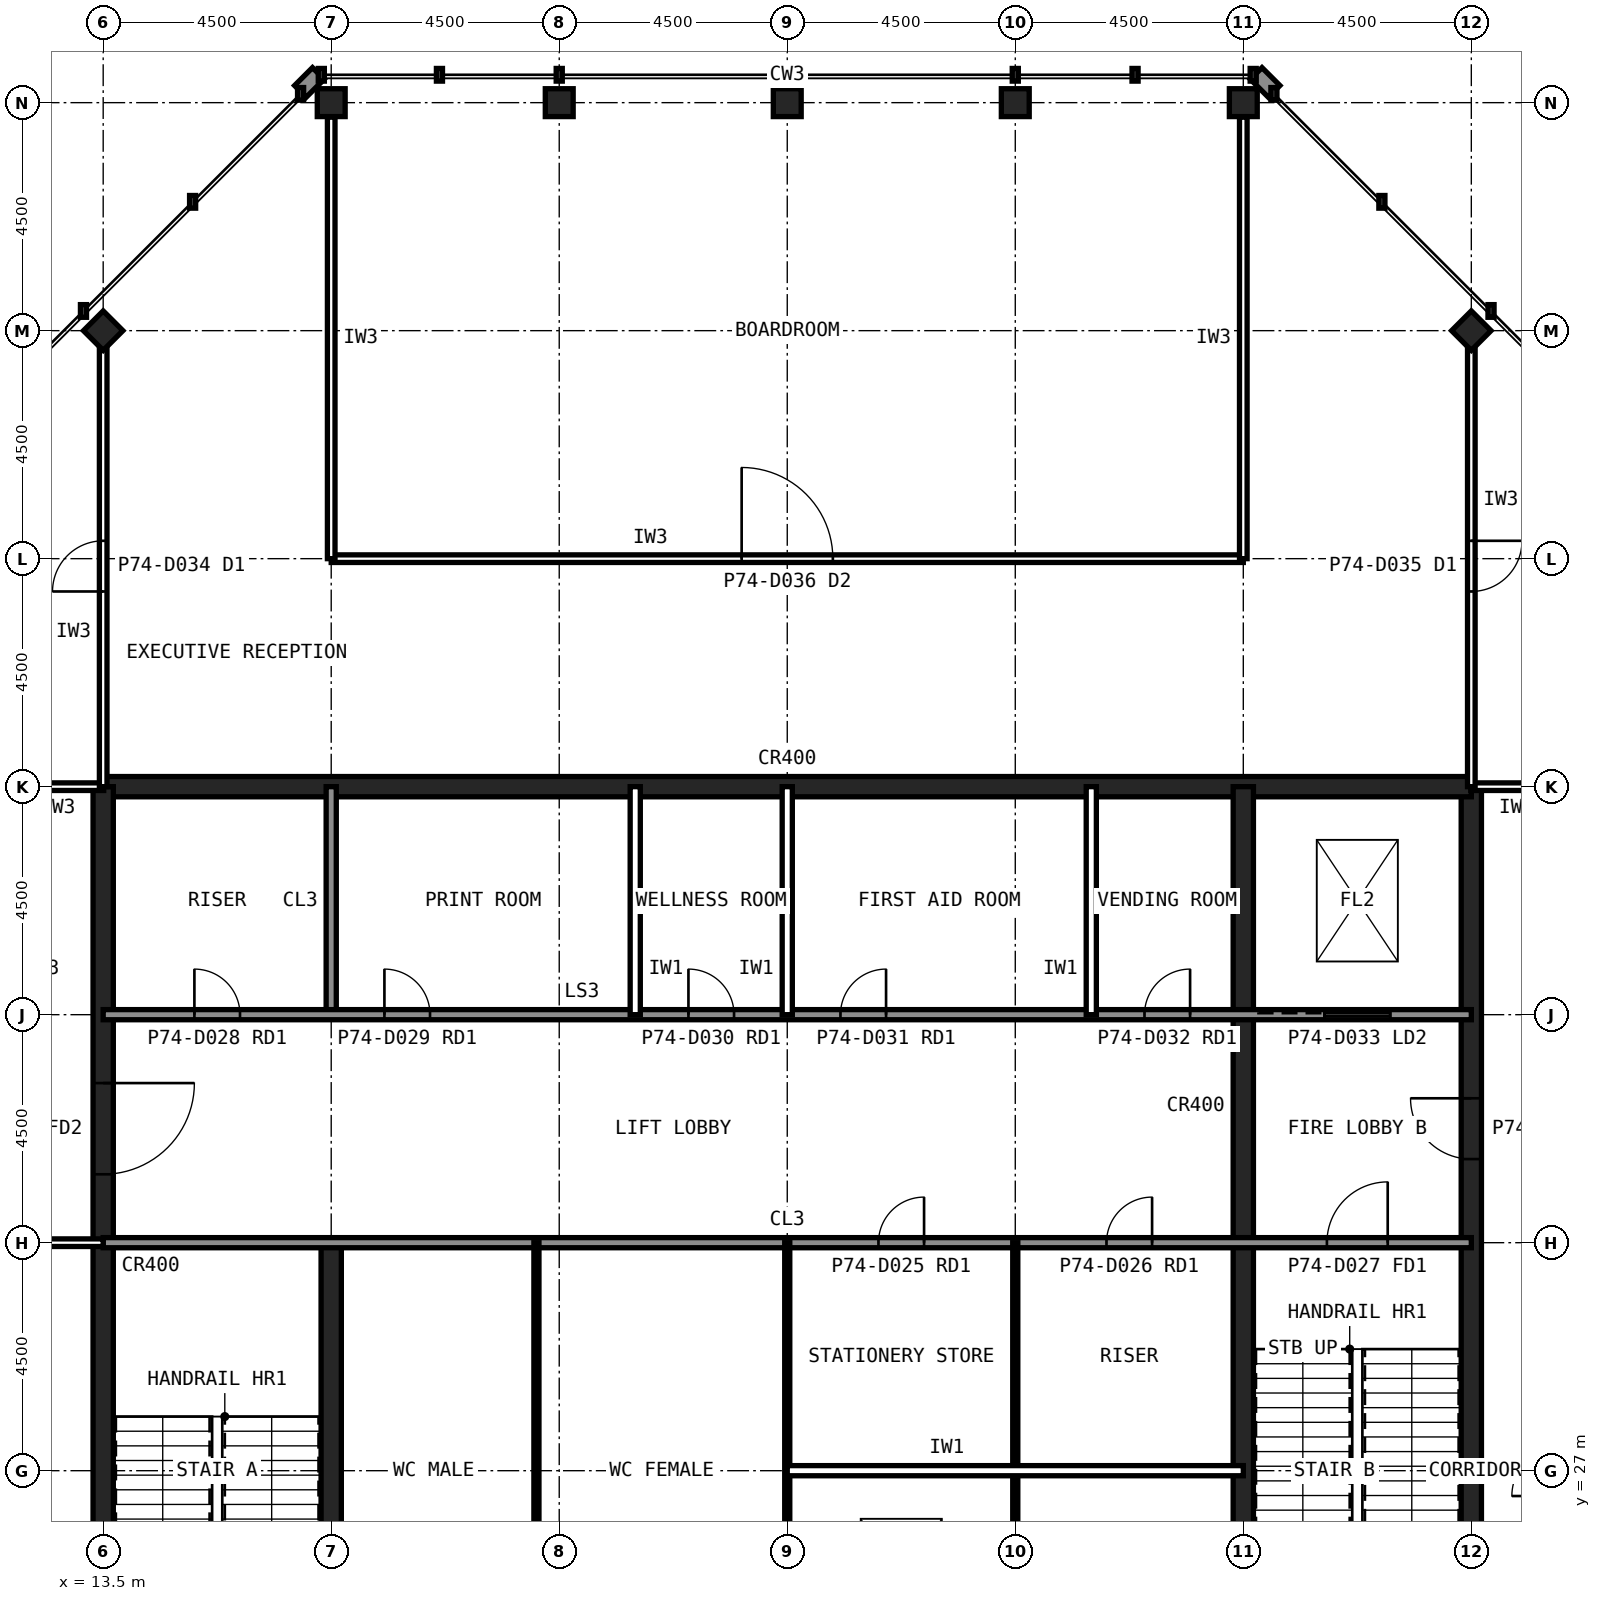
"""IFC4 building model, lengths in metres.
Left out: names, types, materials, properties, quantities, classifications, styles, units other than length and angle.
Written with IfcOpenShell. Run it as: python <this file> out.ifc"""

import sys

from ifc_helpers import new_model, si_unit, direction, frame, frame_2d, origin, origin_2d, place, context, subcontext, project, spatial, rectangle, hollow_rectangle, extrude, element, fill, save


model = new_model("IFC4")
c1 = context("Model", 3, precision=1e-05, world=origin(), true_north=direction((0.0, 1.0)))
c2 = subcontext(c1, "Body", "Model", "MODEL_VIEW")
j1 = project(units=[si_unit("LENGTHUNIT", "METRE"), si_unit("PLANEANGLEUNIT", "RADIAN")], contexts=[c1])
p1 = place(None, origin())
s1 = spatial("IfcSite", under=j1, at=p1, CompositionType="ELEMENT")
p2 = place(p1, origin())
s2 = spatial("IfcBuilding", under=s1, at=p2, CompositionType="ELEMENT")
p3 = place(p2, frame((0.0, 0.0, 310.6)))
s3 = spatial("IfcBuildingStorey", under=s2, at=p3, CompositionType="ELEMENT", Elevation=310.6)
for number, where, z_axis, x_axis in (
    (1, (36.0, 54.0, 0.0), (0.0, 0.0, 1.0), (1.0, 0.0, 0.0)),
    (2, (31.5, 54.0, 0.0), (0.0, 0.0, 1.0), (1.0, 0.0, 0.0)),
    (3, (27.0, 54.0, 0.0), (0.0, 0.0, 1.0), (1.0, 0.0, 0.0)),
    (4, (22.5, 54.0, 0.0), (0.0, 0.0, 1.0), (1.0, 0.0, 0.0)),
    (5, (18.0, 54.0, 0.0), (0.0, 0.0, 1.0), (1.0, 0.0, 0.0)),
    (6, (40.5, 49.5, 0.0), (0.0, 0.0, 1.0), (0.707, 0.707, 0.0)),
    (7, (13.5, 49.5, 0.0), (0.0, 0.0, 1.0), (0.707, 0.707, 0.0)),
):
    element("IfcColumn", number, at=place(p3, frame(where, z_axis=z_axis, x_axis=x_axis)), inside=s3, PredefinedType="COLUMN", context=c2, shape_type="SweptSolid", body=[
        extrude(hollow_rectangle(XDim=0.55, YDim=0.55, WallThickness=0.025, at=origin_2d()), origin(), (0.0, 0.0, 1.0), 4.5),
    ])
p4 = place(p3, frame((40.5, 13.5, 0.0), z_axis=(0.0, 0.0, 1.0), x_axis=(0.0, 1.0, 0.0)))
e8 = element("IfcWall", 8, at=p4, inside=s3, PredefinedType="SHEAR", context=c2, shape_type="SweptSolid", body=[
    extrude(rectangle(XDim=27.0, YDim=0.4, at=frame_2d((13.5, 0.0))), origin(), (0.0, 0.0, 1.0), 4.5),
])
p5 = place(p4, frame((5.85, 0.0, 0.0)))
e9 = element("IfcOpeningElement", 9, at=p5, cuts=e8, PredefinedType="OPENING", context=c2, shape_type="SweptSolid", body=[
    extrude(rectangle(XDim=1.8, YDim=2.1, at=frame_2d((0.9, 1.05))), frame((0.0, 0.21, 0.0), z_axis=(0.0, -1.0, 0.0), x_axis=(1.0, 0.0, 0.0)), (0.0, 0.0, 1.0), 0.42),
])
p6 = place(p4, frame((19.65, 0.0, 0.0)))
e10 = element("IfcOpeningElement", 10, at=p6, cuts=e8, PredefinedType="OPENING", context=c2, shape_type="SweptSolid", body=[
    extrude(rectangle(XDim=1.2, YDim=2.1, at=frame_2d((0.6, 1.05))), frame((0.0, 0.21, 0.0), z_axis=(0.0, -1.0, 0.0), x_axis=(1.0, 0.0, 0.0)), (0.0, 0.0, 1.0), 0.42),
])
p7 = place(p3, frame((40.5, 40.5, 0.0), z_axis=(0.0, 0.0, 1.0), x_axis=(-1.0, 0.0, 0.0)))
e11 = element("IfcWall", 11, at=p7, inside=s3, PredefinedType="SHEAR", context=c2, shape_type="SweptSolid", body=[
    extrude(rectangle(XDim=27.0, YDim=0.4, at=frame_2d((13.5, 0.0))), origin(), (0.0, 0.0, 1.0), 4.5),
])
p8 = place(p3, frame((13.5, 40.5, 0.0), z_axis=(0.0, 0.0, 1.0), x_axis=(0.0, -1.0, 0.0)))
e12 = element("IfcWall", 12, at=p8, inside=s3, PredefinedType="SHEAR", context=c2, shape_type="SweptSolid", body=[
    extrude(rectangle(XDim=27.0, YDim=0.4, at=frame_2d((13.5, 0.0))), origin(), (0.0, 0.0, 1.0), 4.5),
])
p9 = place(p8, frame((19.65, 0.0, 0.0)))
e13 = element("IfcOpeningElement", 13, at=p9, cuts=e12, PredefinedType="OPENING", context=c2, shape_type="SweptSolid", body=[
    extrude(rectangle(XDim=1.2, YDim=2.1, at=frame_2d((0.6, 1.05))), frame((0.0, 0.21, 0.0), z_axis=(0.0, -1.0, 0.0), x_axis=(1.0, 0.0, 0.0)), (0.0, 0.0, 1.0), 0.42),
])
p10 = place(p8, frame((5.85, 0.0, 0.0)))
e14 = element("IfcOpeningElement", 14, at=p10, cuts=e12, PredefinedType="OPENING", context=c2, shape_type="SweptSolid", body=[
    extrude(rectangle(XDim=1.8, YDim=2.1, at=frame_2d((0.9, 1.05))), frame((0.0, 0.21, 0.0), z_axis=(0.0, -1.0, 0.0), x_axis=(1.0, 0.0, 0.0)), (0.0, 0.0, 1.0), 0.42),
])
p11 = place(p3, frame((18.0, 13.5, 0.0), z_axis=(0.0, 0.0, 1.0), x_axis=(0.0, 1.0, 0.0)))
e15 = element("IfcWall", 15, at=p11, inside=s3, PredefinedType="SHEAR", context=c2, shape_type="SweptSolid", body=[
    extrude(rectangle(XDim=18.0, YDim=0.4, at=frame_2d((9.0, 0.0))), origin(), (0.0, 0.0, 1.0), 4.5),
])
p12 = place(p3, frame((18.0, 36.0, 0.0), z_axis=(0.0, 0.0, 1.0), x_axis=(0.0, 1.0, 0.0)))
e16 = element("IfcWall", 16, at=p12, inside=s3, PredefinedType="SOLIDWALL", context=c2, shape_type="SweptSolid", body=[
    extrude(rectangle(XDim=4.5, YDim=0.2, at=frame_2d((2.25, 0.0))), origin(), (0.0, 0.0, 1.0), 4.32),
])
p13 = place(p3, frame((36.0, 22.5, 0.0), z_axis=(0.0, 0.0, 1.0), x_axis=(0.0, 1.0, 0.0)))
e17 = element("IfcWall", 17, at=p13, inside=s3, PredefinedType="SHEAR", context=c2, shape_type="SweptSolid", body=[
    extrude(rectangle(XDim=18.0, YDim=0.4, at=frame_2d((9.0, 0.0))), origin(), (0.0, 0.0, 1.0), 4.5),
])
p14 = place(p3, frame((13.5, 36.0, 0.0), z_axis=(0.0, 0.0, 1.0), x_axis=(1.0, 0.0, 0.0)))
e18 = element("IfcWall", 18, at=p14, inside=s3, PredefinedType="SOLIDWALL", context=c2, shape_type="SweptSolid", body=[
    extrude(rectangle(XDim=27.0, YDim=0.2, at=frame_2d((13.5, 0.0))), origin(), (0.0, 0.0, 1.0), 4.32),
])
p15 = place(p14, frame((1.8, 0.0, 0.0)))
e19 = element("IfcOpeningElement", 19, at=p15, cuts=e18, PredefinedType="OPENING", context=c2, shape_type="SweptSolid", body=[
    extrude(rectangle(XDim=0.9, YDim=2.1, at=frame_2d((0.45, 1.05))), frame((0.0, 0.11, 0.0), z_axis=(0.0, -1.0, 0.0), x_axis=(1.0, 0.0, 0.0)), (0.0, 0.0, 1.0), 0.22),
])
p16 = place(p14, frame((5.55, 0.0, 0.0)))
e20 = element("IfcOpeningElement", 20, at=p16, cuts=e18, PredefinedType="OPENING", context=c2, shape_type="SweptSolid", body=[
    extrude(rectangle(XDim=0.9, YDim=2.1, at=frame_2d((0.45, 1.05))), frame((0.0, 0.11, 0.0), z_axis=(0.0, -1.0, 0.0), x_axis=(1.0, 0.0, 0.0)), (0.0, 0.0, 1.0), 0.22),
])
p17 = place(p14, frame((11.55, 0.0, 0.0)))
e21 = element("IfcOpeningElement", 21, at=p17, cuts=e18, PredefinedType="OPENING", context=c2, shape_type="SweptSolid", body=[
    extrude(rectangle(XDim=0.9, YDim=2.1, at=frame_2d((0.45, 1.05))), frame((0.0, 0.11, 0.0), z_axis=(0.0, -1.0, 0.0), x_axis=(1.0, 0.0, 0.0)), (0.0, 0.0, 1.0), 0.22),
])
p18 = place(p14, frame((14.55, 0.0, 0.0)))
e22 = element("IfcOpeningElement", 22, at=p18, cuts=e18, PredefinedType="OPENING", context=c2, shape_type="SweptSolid", body=[
    extrude(rectangle(XDim=0.9, YDim=2.1, at=frame_2d((0.45, 1.05))), frame((0.0, 0.11, 0.0), z_axis=(0.0, -1.0, 0.0), x_axis=(1.0, 0.0, 0.0)), (0.0, 0.0, 1.0), 0.22),
])
p19 = place(p14, frame((20.55, 0.0, 0.0)))
e23 = element("IfcOpeningElement", 23, at=p19, cuts=e18, PredefinedType="OPENING", context=c2, shape_type="SweptSolid", body=[
    extrude(rectangle(XDim=0.9, YDim=2.1, at=frame_2d((0.45, 1.05))), frame((0.0, 0.11, 0.0), z_axis=(0.0, -1.0, 0.0), x_axis=(1.0, 0.0, 0.0)), (0.0, 0.0, 1.0), 0.22),
])
p20 = place(p14, frame((24.1, 0.0, 0.0)))
e24 = element("IfcOpeningElement", 24, at=p20, cuts=e18, PredefinedType="OPENING", context=c2, shape_type="SweptSolid", body=[
    extrude(rectangle(XDim=1.3, YDim=2.2, at=frame_2d((0.65, 1.1))), frame((0.0, 0.11, 0.0), z_axis=(0.0, -1.0, 0.0), x_axis=(1.0, 0.0, 0.0)), (0.0, 0.0, 1.0), 0.22),
])
p21 = place(p3, frame((13.5, 31.5, 0.0), z_axis=(0.0, 0.0, 1.0), x_axis=(1.0, 0.0, 0.0)))
e25 = element("IfcWall", 25, at=p21, inside=s3, PredefinedType="SOLIDWALL", context=c2, shape_type="SweptSolid", body=[
    extrude(rectangle(XDim=27.0, YDim=0.2, at=frame_2d((13.5, 0.0))), origin(), (0.0, 0.0, 1.0), 4.32),
])
p22 = place(p21, frame((24.15, 0.0, 0.0)))
e26 = element("IfcOpeningElement", 26, at=p22, cuts=e25, PredefinedType="OPENING", context=c2, shape_type="SweptSolid", body=[
    extrude(rectangle(XDim=1.2, YDim=2.1, at=frame_2d((0.6, 1.05))), frame((0.0, 0.11, 0.0), z_axis=(0.0, -1.0, 0.0), x_axis=(1.0, 0.0, 0.0)), (0.0, 0.0, 1.0), 0.22),
])
p23 = place(p21, frame((15.3, 0.0, 0.0)))
e27 = element("IfcOpeningElement", 27, at=p23, cuts=e25, PredefinedType="OPENING", context=c2, shape_type="SweptSolid", body=[
    extrude(rectangle(XDim=0.9, YDim=2.1, at=frame_2d((0.45, 1.05))), frame((0.0, 0.11, 0.0), z_axis=(0.0, -1.0, 0.0), x_axis=(1.0, 0.0, 0.0)), (0.0, 0.0, 1.0), 0.22),
])
p24 = place(p21, frame((19.8, 0.0, 0.0)))
e28 = element("IfcOpeningElement", 28, at=p24, cuts=e25, PredefinedType="OPENING", context=c2, shape_type="SweptSolid", body=[
    extrude(rectangle(XDim=0.9, YDim=2.1, at=frame_2d((0.45, 1.05))), frame((0.0, 0.11, 0.0), z_axis=(0.0, -1.0, 0.0), x_axis=(1.0, 0.0, 0.0)), (0.0, 0.0, 1.0), 0.22),
])
for number, where, z_axis, x_axis in (
    (29, (24.0, 36.0, 0.0), (0.0, 0.0, 1.0), (0.0, 1.0, 0.0)),
    (30, (27.0, 36.0, 0.0), (0.0, 0.0, 1.0), (0.0, 1.0, 0.0)),
    (31, (33.0, 36.0, 0.0), (0.0, 0.0, 1.0), (0.0, 1.0, 0.0)),
):
    element("IfcWall", number, at=place(p3, frame(where, z_axis=z_axis, x_axis=x_axis)), inside=s3, PredefinedType="PARTITIONING", context=c2, shape_type="SweptSolid", body=[
        extrude(rectangle(XDim=4.5, YDim=0.2, at=frame_2d((2.25, 0.0))), origin(), (0.0, 0.0, 1.0), 4.32),
    ])
for number, where, z_axis, x_axis in (
    (32, (22.05, 22.5, 0.0), (0.0, 0.0, 1.0), (0.0, 1.0, 0.0)),
    (33, (27.0, 22.5, 0.0), (0.0, 0.0, 1.0), (0.0, 1.0, 0.0)),
    (34, (31.5, 22.5, 0.0), (0.0, 0.0, 1.0), (0.0, 1.0, 0.0)),
):
    element("IfcWall", number, at=place(p3, frame(where, z_axis=z_axis, x_axis=x_axis)), inside=s3, PredefinedType="PLUMBINGWALL", context=c2, shape_type="SweptSolid", body=[
        extrude(rectangle(XDim=9.0, YDim=0.1, at=frame_2d((4.5, 0.0))), origin(), (0.0, 0.0, 1.0), 4.32),
    ])
p25 = place(p3, frame((27.0, 27.0, 0.0), z_axis=(0.0, 0.0, 1.0), x_axis=(1.0, 0.0, 0.0)))
e35 = element("IfcWall", 35, at=p25, inside=s3, PredefinedType="PARTITIONING", context=c2, shape_type="SweptSolid", body=[
    extrude(rectangle(XDim=9.0, YDim=0.2, at=frame_2d((4.5, 0.0))), origin(), (0.0, 0.0, 1.0), 4.32),
])
for number, where, z_axis, x_axis in (
    (36, (13.51, 40.5, 0.0), (0.0, 0.0, 1.0), (-1.0, 0.0, 0.0)),
    (37, (42.3, 40.5, 0.0), (0.0, 0.0, 1.0), (-1.0, 0.0, 0.0)),
):
    element("IfcWall", number, at=place(p3, frame(where, z_axis=z_axis, x_axis=x_axis)), inside=s3, PredefinedType="PARTITIONING", context=c2, shape_type="SweptSolid", body=[
        extrude(rectangle(XDim=1.81, YDim=0.15, at=frame_2d((0.905, 0.0))), origin(), (0.0, 0.0, 1.0), 3.393),
    ])
p26 = place(p3, frame((18.0, 45.0, 0.0), z_axis=(0.0, 0.0, 1.0), x_axis=(1.0, 0.0, 0.0)))
e38 = element("IfcWall", 38, at=p26, inside=s3, PredefinedType="PARTITIONING", context=c2, shape_type="SweptSolid", body=[
    extrude(rectangle(XDim=18.0, YDim=0.15, at=frame_2d((9.0, 0.0))), origin(), (0.0, 0.0, 1.0), 4.32),
])
p27 = place(p26, frame((8.1, 0.0, 0.0)))
e39 = element("IfcOpeningElement", 39, at=p27, cuts=e38, PredefinedType="OPENING", context=c2, shape_type="SweptSolid", body=[
    extrude(rectangle(XDim=1.8, YDim=2.4, at=frame_2d((0.9, 1.2))), frame((0.0, 0.085, 0.0), z_axis=(0.0, -1.0, 0.0), x_axis=(1.0, 0.0, 0.0)), (0.0, 0.0, 1.0), 0.17),
])
for number, where, z_axis, x_axis in (
    (40, (36.0, 45.0, 0.0), (0.0, 0.0, 1.0), (0.0, 1.0, 0.0)),
    (41, (18.0, 53.715, 0.0), (0.0, 0.0, 1.0), (0.0, -1.0, 0.0)),
):
    element("IfcWall", number, at=place(p3, frame(where, z_axis=z_axis, x_axis=x_axis)), inside=s3, PredefinedType="PARTITIONING", context=c2, shape_type="SweptSolid", body=[
        extrude(rectangle(XDim=8.715, YDim=0.15, at=frame_2d((4.357, 0.0))), origin(), (0.0, 0.0, 1.0), 3.393),
    ])
p28 = place(p3, frame((13.5, 31.5, 0.0), z_axis=(0.0, 0.0, 1.0), x_axis=(-1.0, 0.0, 0.0)))
e42 = element("IfcWall", 42, at=p28, inside=s3, PredefinedType="PARTITIONING", context=c2, shape_type="SweptSolid", body=[
    extrude(rectangle(XDim=4.5, YDim=0.15, at=frame_2d((2.25, 0.0))), origin(), (0.0, 0.0, 1.0), 3.393),
])
p29 = place(p3, frame((40.5, 49.205, 0.0), z_axis=(0.0, 0.0, 1.0), x_axis=(0.0, -1.0, 0.0)))
e43 = element("IfcWall", 43, at=p29, inside=s3, PredefinedType="PARTITIONING", context=c2, shape_type="SweptSolid", body=[
    extrude(rectangle(XDim=8.705, YDim=0.15, at=frame_2d((4.353, 0.0))), origin(), (0.0, 0.0, 1.0), 3.393),
])
p30 = place(p29, frame((3.853, 0.0, 0.0)))
e44 = element("IfcOpeningElement", 44, at=p30, cuts=e43, PredefinedType="OPENING", context=c2, shape_type="SweptSolid", body=[
    extrude(rectangle(XDim=1.0, YDim=2.1, at=frame_2d((0.5, 1.05))), frame((0.0, 0.085, 0.0), z_axis=(0.0, -1.0, 0.0), x_axis=(1.0, 0.0, 0.0)), (0.0, 0.0, 1.0), 0.17),
])
p31 = place(p3, frame((13.5, 40.5, 0.0), z_axis=(0.0, 0.0, 1.0), x_axis=(0.0, 1.0, 0.0)))
e45 = element("IfcWall", 45, at=p31, inside=s3, PredefinedType="PARTITIONING", context=c2, shape_type="SweptSolid", body=[
    extrude(rectangle(XDim=8.705, YDim=0.15, at=frame_2d((4.353, 0.0))), origin(), (0.0, 0.0, 1.0), 3.393),
])
p32 = place(p31, frame((3.853, 0.0, 0.0)))
e46 = element("IfcOpeningElement", 46, at=p32, cuts=e45, PredefinedType="OPENING", context=c2, shape_type="SweptSolid", body=[
    extrude(rectangle(XDim=1.0, YDim=2.1, at=frame_2d((0.5, 1.05))), frame((0.0, 0.085, 0.0), z_axis=(0.0, -1.0, 0.0), x_axis=(1.0, 0.0, 0.0)), (0.0, 0.0, 1.0), 0.17),
])
p33 = place(p10, origin())
e47 = element("IfcDoor", 47, at=p33, inside=s3, OperationType="SINGLE_SWING_LEFT", PredefinedType="DOOR", context=c2, shape_type="SweptSolid", body=[
    extrude(rectangle(XDim=1.8, YDim=2.1, at=frame_2d((0.9, 1.05))), frame((0.0, 0.025, 0.0), z_axis=(0.0, -1.0, 0.0), x_axis=(1.0, 0.0, 0.0)), (0.0, 0.0, 1.0), 0.05),
])
fill(e14, e47)
p34 = place(p6, origin())
e48 = element("IfcDoor", 48, at=p34, inside=s3, OperationType="SINGLE_SWING_RIGHT", PredefinedType="DOOR", context=c2, shape_type="SweptSolid", body=[
    extrude(rectangle(XDim=1.2, YDim=2.1, at=frame_2d((0.6, 1.05))), frame((0.0, 0.025, 0.0), z_axis=(0.0, -1.0, 0.0), x_axis=(1.0, 0.0, 0.0)), (0.0, 0.0, 1.0), 0.05),
])
fill(e10, e48)
p35 = place(p22, origin())
e49 = element("IfcDoor", 49, at=p35, inside=s3, OperationType="SINGLE_SWING_RIGHT", PredefinedType="DOOR", context=c2, shape_type="SweptSolid", body=[
    extrude(rectangle(XDim=1.2, YDim=2.1, at=frame_2d((0.6, 1.05))), frame((0.0, 0.025, 0.0), z_axis=(0.0, -1.0, 0.0), x_axis=(1.0, 0.0, 0.0)), (0.0, 0.0, 1.0), 0.05),
])
fill(e26, e49)
p36 = place(p23, origin())
e50 = element("IfcDoor", 50, at=p36, inside=s3, OperationType="SINGLE_SWING_RIGHT", PredefinedType="DOOR", context=c2, shape_type="SweptSolid", body=[
    extrude(rectangle(XDim=0.9, YDim=2.1, at=frame_2d((0.45, 1.05))), frame((0.0, 0.025, 0.0), z_axis=(0.0, -1.0, 0.0), x_axis=(1.0, 0.0, 0.0)), (0.0, 0.0, 1.0), 0.05),
])
fill(e27, e50)
p37 = place(p24, origin())
e51 = element("IfcDoor", 51, at=p37, inside=s3, OperationType="SINGLE_SWING_RIGHT", PredefinedType="DOOR", context=c2, shape_type="SweptSolid", body=[
    extrude(rectangle(XDim=0.9, YDim=2.1, at=frame_2d((0.45, 1.05))), frame((0.0, 0.025, 0.0), z_axis=(0.0, -1.0, 0.0), x_axis=(1.0, 0.0, 0.0)), (0.0, 0.0, 1.0), 0.05),
])
fill(e28, e51)
p38 = place(p15, origin())
e52 = element("IfcDoor", 52, at=p38, inside=s3, OperationType="SINGLE_SWING_LEFT", PredefinedType="DOOR", context=c2, shape_type="SweptSolid", body=[
    extrude(rectangle(XDim=0.9, YDim=2.1, at=frame_2d((0.45, 1.05))), frame((0.0, 0.025, 0.0), z_axis=(0.0, -1.0, 0.0), x_axis=(1.0, 0.0, 0.0)), (0.0, 0.0, 1.0), 0.05),
])
fill(e19, e52)
p39 = place(p16, origin())
e53 = element("IfcDoor", 53, at=p39, inside=s3, OperationType="SINGLE_SWING_LEFT", PredefinedType="DOOR", context=c2, shape_type="SweptSolid", body=[
    extrude(rectangle(XDim=0.9, YDim=2.1, at=frame_2d((0.45, 1.05))), frame((0.0, 0.025, 0.0), z_axis=(0.0, -1.0, 0.0), x_axis=(1.0, 0.0, 0.0)), (0.0, 0.0, 1.0), 0.05),
])
fill(e20, e53)
p40 = place(p17, origin())
e54 = element("IfcDoor", 54, at=p40, inside=s3, OperationType="SINGLE_SWING_LEFT", PredefinedType="DOOR", context=c2, shape_type="SweptSolid", body=[
    extrude(rectangle(XDim=0.9, YDim=2.1, at=frame_2d((0.45, 1.05))), frame((0.0, 0.025, 0.0), z_axis=(0.0, -1.0, 0.0), x_axis=(1.0, 0.0, 0.0)), (0.0, 0.0, 1.0), 0.05),
])
fill(e21, e54)
p41 = place(p18, origin())
e55 = element("IfcDoor", 55, at=p41, inside=s3, OperationType="SINGLE_SWING_RIGHT", PredefinedType="DOOR", context=c2, shape_type="SweptSolid", body=[
    extrude(rectangle(XDim=0.9, YDim=2.1, at=frame_2d((0.45, 1.05))), frame((0.0, 0.025, 0.0), z_axis=(0.0, -1.0, 0.0), x_axis=(1.0, 0.0, 0.0)), (0.0, 0.0, 1.0), 0.05),
])
fill(e22, e55)
p42 = place(p19, origin())
e56 = element("IfcDoor", 56, at=p42, inside=s3, OperationType="SINGLE_SWING_RIGHT", PredefinedType="DOOR", context=c2, shape_type="SweptSolid", body=[
    extrude(rectangle(XDim=0.9, YDim=2.1, at=frame_2d((0.45, 1.05))), frame((0.0, 0.025, 0.0), z_axis=(0.0, -1.0, 0.0), x_axis=(1.0, 0.0, 0.0)), (0.0, 0.0, 1.0), 0.05),
])
fill(e23, e56)
p43 = place(p20, origin())
e57 = element("IfcDoor", 57, at=p43, inside=s3, OperationType="SLIDING_TO_LEFT", PredefinedType="DOOR", context=c2, shape_type="SweptSolid", body=[
    extrude(rectangle(XDim=1.3, YDim=2.2, at=frame_2d((0.65, 1.1))), frame((0.0, 0.025, 0.0), z_axis=(0.0, -1.0, 0.0), x_axis=(1.0, 0.0, 0.0)), (0.0, 0.0, 1.0), 0.05),
])
fill(e24, e57)
p44 = place(p27, origin())
e58 = element("IfcDoor", 58, at=p44, inside=s3, OperationType="SINGLE_SWING_LEFT", PredefinedType="DOOR", context=c2, shape_type="SweptSolid", body=[
    extrude(rectangle(XDim=1.8, YDim=2.4, at=frame_2d((0.9, 1.2))), frame((0.0, 0.025, 0.0), z_axis=(0.0, -1.0, 0.0), x_axis=(1.0, 0.0, 0.0)), (0.0, 0.0, 1.0), 0.05),
])
fill(e39, e58)
p45 = place(p30, origin())
e59 = element("IfcDoor", 59, at=p45, inside=s3, OperationType="SINGLE_SWING_LEFT", PredefinedType="DOOR", context=c2, shape_type="SweptSolid", body=[
    extrude(rectangle(XDim=1.0, YDim=2.1, at=frame_2d((0.5, 1.05))), frame((0.0, 0.025, 0.0), z_axis=(0.0, -1.0, 0.0), x_axis=(1.0, 0.0, 0.0)), (0.0, 0.0, 1.0), 0.05),
])
fill(e44, e59)
p46 = place(p32, origin())
e60 = element("IfcDoor", 60, at=p46, inside=s3, OperationType="SINGLE_SWING_LEFT", PredefinedType="DOOR", context=c2, shape_type="SweptSolid", body=[
    extrude(rectangle(XDim=1.0, YDim=2.1, at=frame_2d((0.5, 1.05))), frame((0.0, 0.025, 0.0), z_axis=(0.0, -1.0, 0.0), x_axis=(1.0, 0.0, 0.0)), (0.0, 0.0, 1.0), 0.05),
])
fill(e46, e60)
save(model, sys.argv[1])
